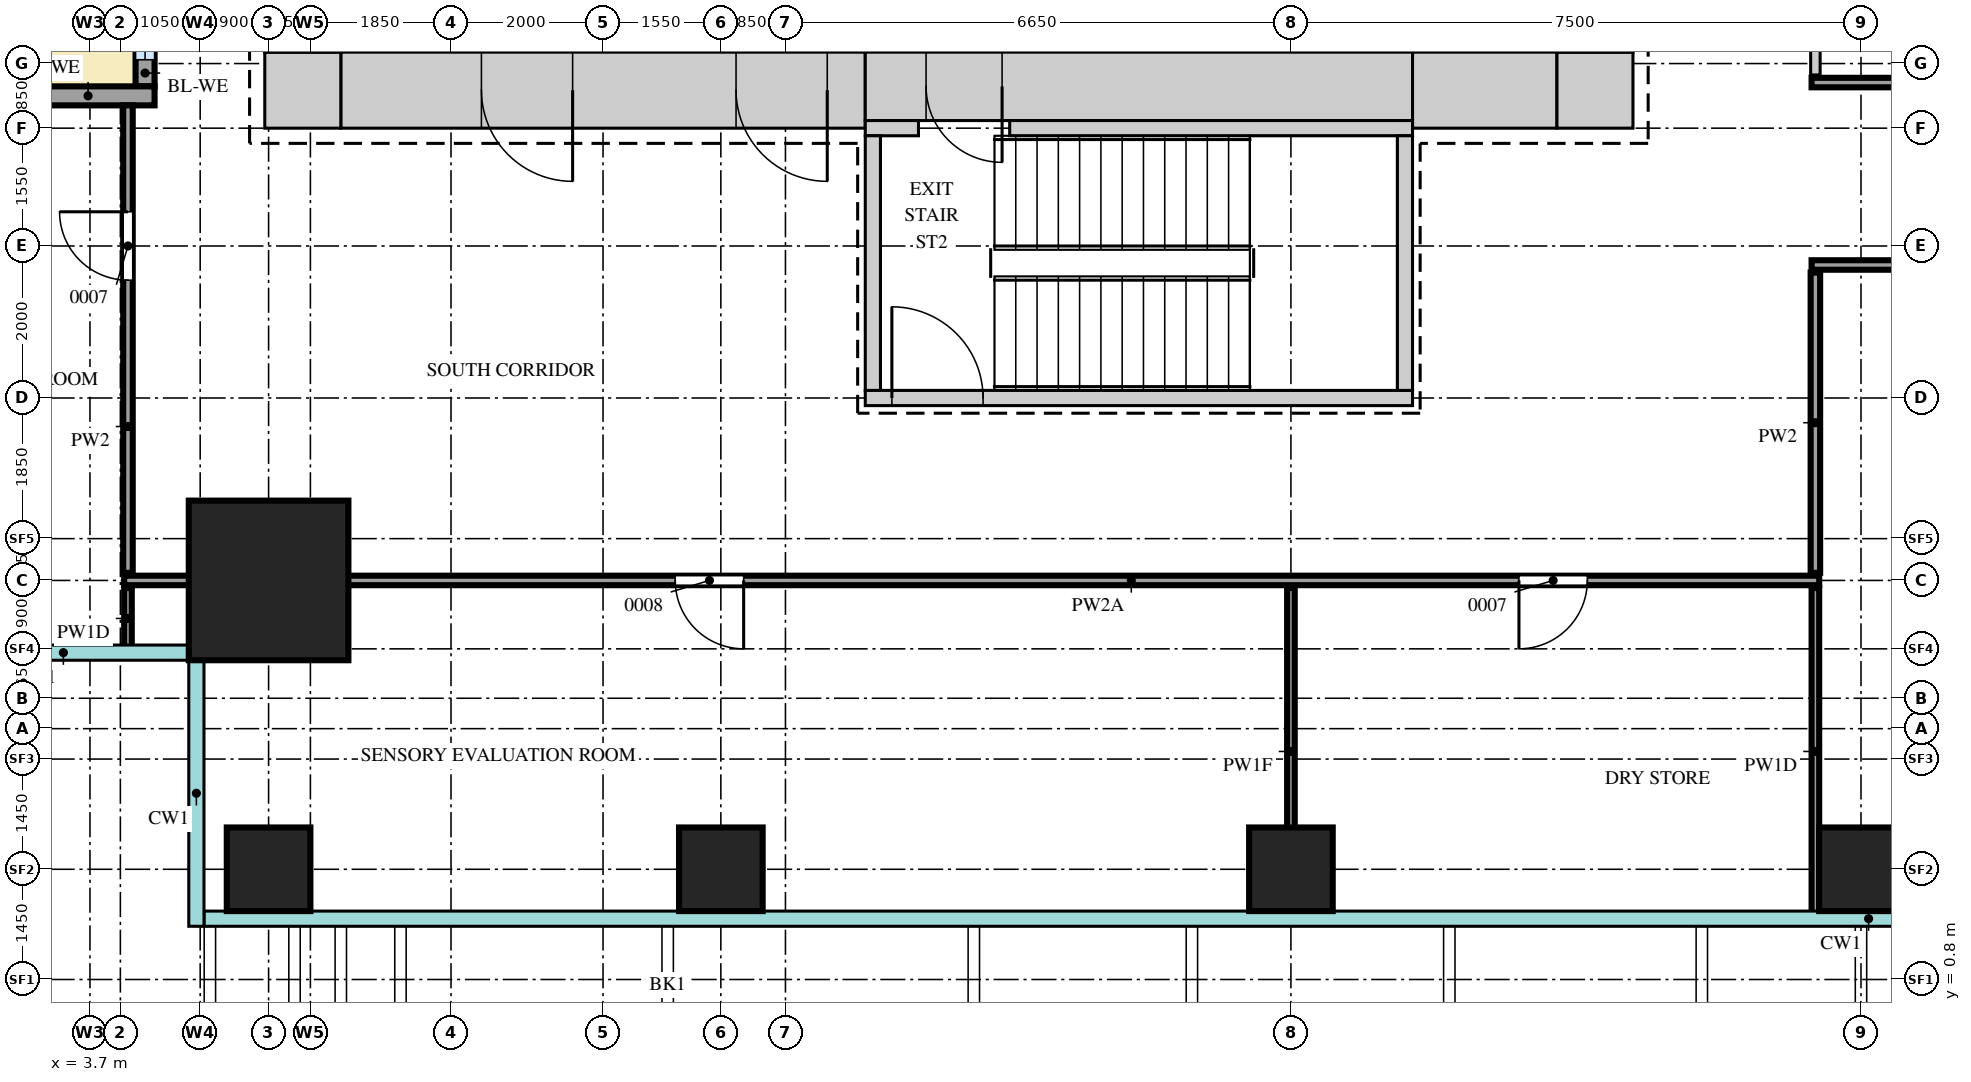
"""IFC4 building model, lengths in metres.
Left out: names, types, materials, properties, quantities, classifications, styles, units other than length and angle.
Written with IfcOpenShell. Run it as: python <this file> out.ifc"""

import sys

from ifc_helpers import new_model, si_unit, direction, frame, frame_2d, origin, origin_2d, place, context, subcontext, project, spatial, rectangle, extrude, source, transform, mapped, element, fill, save


model = new_model("IFC4")
c1 = context("Model", 3, precision=1e-05, world=origin(), true_north=direction((0.0, 1.0)))
c2 = subcontext(c1, "Body", "Model", "MODEL_VIEW")
j1 = project(units=[si_unit("LENGTHUNIT", "METRE"), si_unit("PLANEANGLEUNIT", "RADIAN")], contexts=[c1])
p1 = place(None, origin())
s1 = spatial("IfcSite", under=j1, at=p1, CompositionType="ELEMENT")
p2 = place(p1, origin())
s2 = spatial("IfcBuilding", under=s1, at=p2, CompositionType="ELEMENT")
p3 = place(p2, frame((0.0, 0.0, 114.7)))
s3 = spatial("IfcBuildingStorey", under=s2, at=p3, CompositionType="ELEMENT", Elevation=114.7)
m1 = source(origin(), c2, "Body", "SweptSolid", [
    extrude(rectangle(XDim=6.9, YDim=1.0, at=frame_2d((3.45, 0.0))), origin(), (0.0, 0.0, 1.0), 4.1),
])
p4 = place(p3, frame((7.0, 12.5, 0.0), z_axis=(0.0, 0.0, 1.0), x_axis=(1.0, 0.0, 0.0)))
e1 = element("IfcWall", 1, at=p4, inside=s3, PredefinedType="SHEAR", context=c2, shape_type="MappedRepresentation", body=[
    mapped(m1, transform((0.0, 0.0, 0.0))),
])
m2 = source(origin(), c2, "Body", "SweptSolid", [
    extrude(rectangle(XDim=1.2, YDim=2.1, at=frame_2d((0.6, 1.05))), frame((0.0, 0.51, 0.0), z_axis=(0.0, -1.0, 0.0), x_axis=(1.0, 0.0, 0.0)), (0.0, 0.0, 1.0), 1.02),
])
p5 = place(p4, frame((5.2, 0.0, 0.0)))
e2 = element("IfcOpeningElement", 2, at=p5, cuts=e1, PredefinedType="OPENING", context=c2, shape_type="MappedRepresentation", body=[
    mapped(m2, transform((0.0, 0.0, 0.0))),
])
p6 = place(p4, frame((1.85, 0.0, 0.0)))
e3 = element("IfcOpeningElement", 3, at=p6, cuts=e1, PredefinedType="OPENING", context=c2, shape_type="MappedRepresentation", body=[
    mapped(m2, transform((0.0, 0.0, 0.0))),
])
m3 = source(origin(), c2, "Body", "SweptSolid", [
    extrude(rectangle(XDim=7.2, YDim=0.9, at=frame_2d((3.6, 0.0))), origin(), (0.0, 0.0, 1.0), 4.1),
])
p7 = place(p3, frame((13.9, 12.55, 0.0), z_axis=(0.0, 0.0, 1.0), x_axis=(1.0, 0.0, 0.0)))
e4 = element("IfcWall", 4, at=p7, inside=s3, PredefinedType="SHEAR", context=c2, shape_type="MappedRepresentation", body=[
    mapped(m3, transform((0.0, 0.0, 0.0))),
])
m4 = source(origin(), c2, "Body", "SweptSolid", [
    extrude(rectangle(XDim=1.0, YDim=2.1, at=frame_2d((0.5, 1.05))), frame((0.0, 0.46, 0.0), z_axis=(0.0, -1.0, 0.0), x_axis=(1.0, 0.0, 0.0)), (0.0, 0.0, 1.0), 0.92),
])
p8 = place(p7, frame((0.8, 0.0, 0.0)))
e5 = element("IfcOpeningElement", 5, at=p8, cuts=e4, PredefinedType="OPENING", context=c2, shape_type="MappedRepresentation", body=[
    mapped(m4, transform((0.0, 0.0, 0.0))),
])
m5 = source(origin(), c2, "Body", "SweptSolid", [
    extrude(rectangle(XDim=1.9, YDim=1.0, at=frame_2d((0.95, 0.0))), origin(), (0.0, 0.0, 1.0), 4.1),
])
p9 = place(p3, frame((21.1, 12.5, 0.0), z_axis=(0.0, 0.0, 1.0), x_axis=(1.0, 0.0, 0.0)))
e6 = element("IfcWall", 6, at=p9, inside=s3, PredefinedType="SHEAR", context=c2, shape_type="MappedRepresentation", body=[
    mapped(m5, transform((0.0, 0.0, 0.0))),
])
m6 = source(origin(), c2, "Body", "SweptSolid", [
    extrude(rectangle(XDim=1.0, YDim=1.0, at=frame_2d((0.5, 0.0))), origin(), (0.0, 0.0, 1.0), 4.1),
])
for number, where, z_axis, x_axis in (
    (7, (23.0, 12.5, 0.0), (0.0, 0.0, 1.0), (1.0, 0.0, 0.0)),
    (8, (6.0, 12.5, 0.0), (0.0, 0.0, 1.0), (1.0, 0.0, 0.0)),
):
    element("IfcWall", number, at=place(p3, frame(where, z_axis=z_axis, x_axis=x_axis)), inside=s3, PredefinedType="SHEAR", context=c2, shape_type="MappedRepresentation", body=[
        mapped(m6, transform((0.0, 0.0, 0.0))),
    ])
m7 = source(origin(), c2, "Body", "SweptSolid", [
    extrude(rectangle(XDim=0.7, YDim=0.2, at=frame_2d((0.35, 0.0))), origin(), (0.0, 0.0, 1.0), 4.1),
])
p10 = place(p3, frame((13.9, 12.0, 0.0), z_axis=(0.0, 0.0, 1.0), x_axis=(1.0, 0.0, 0.0)))
e9 = element("IfcWall", 9, at=p10, inside=s3, PredefinedType="SHEAR", context=c2, shape_type="MappedRepresentation", body=[
    mapped(m7, transform((0.0, 0.0, 0.0))),
])
m8 = source(origin(), c2, "Body", "SweptSolid", [
    extrude(rectangle(XDim=5.3, YDim=0.2, at=frame_2d((2.65, 0.0))), origin(), (0.0, 0.0, 1.0), 4.1),
])
p11 = place(p3, frame((15.8, 12.0, 0.0), z_axis=(0.0, 0.0, 1.0), x_axis=(1.0, 0.0, 0.0)))
e10 = element("IfcWall", 10, at=p11, inside=s3, PredefinedType="SHEAR", context=c2, shape_type="MappedRepresentation", body=[
    mapped(m8, transform((0.0, 0.0, 0.0))),
])
m9 = source(origin(), c2, "Body", "SweptSolid", [
    extrude(rectangle(XDim=7.2, YDim=0.2, at=frame_2d((3.6, 0.0))), origin(), (0.0, 0.0, 1.0), 4.1),
])
p12 = place(p3, frame((13.9, 8.45, 0.0), z_axis=(0.0, 0.0, 1.0), x_axis=(1.0, 0.0, 0.0)))
e11 = element("IfcWall", 11, at=p12, inside=s3, PredefinedType="SHEAR", context=c2, shape_type="MappedRepresentation", body=[
    mapped(m9, transform((0.0, 0.0, 0.0))),
])
m10 = source(origin(), c2, "Body", "SweptSolid", [
    extrude(rectangle(XDim=1.2, YDim=2.1, at=frame_2d((0.6, 1.05))), frame((0.0, 0.11, 0.0), z_axis=(0.0, -1.0, 0.0), x_axis=(1.0, 0.0, 0.0)), (0.0, 0.0, 1.0), 0.22),
])
p13 = place(p12, frame((0.35, 0.0, 0.0)))
e12 = element("IfcOpeningElement", 12, at=p13, cuts=e11, PredefinedType="OPENING", context=c2, shape_type="MappedRepresentation", body=[
    mapped(m10, transform((0.0, 0.0, 0.0))),
])
m11 = source(origin(), c2, "Body", "SweptSolid", [
    extrude(rectangle(XDim=3.35, YDim=0.2, at=frame_2d((1.675, 0.0))), origin(), (0.0, 0.0, 1.0), 4.1),
])
for number, where, z_axis, x_axis in (
    (13, (21.0, 8.55, 0.0), (0.0, 0.0, 1.0), (0.0, 1.0, 0.0)),
    (14, (14.0, 8.55, 0.0), (0.0, 0.0, 1.0), (0.0, 1.0, 0.0)),
):
    element("IfcWall", number, at=place(p3, frame(where, z_axis=z_axis, x_axis=x_axis)), inside=s3, PredefinedType="SHEAR", context=c2, shape_type="MappedRepresentation", body=[
        mapped(m11, transform((0.0, 0.0, 0.0))),
    ])
m12 = source(origin(), c2, "Body", "SweptSolid", [
    extrude(rectangle(XDim=2.1, YDim=2.1, at=origin_2d()), origin(), (0.0, 0.0, 1.0), 4.4),
])
p14 = place(p3, frame((6.05, 6.05, 0.0), z_axis=(0.0, 0.0, 1.0), x_axis=(1.0, 0.0, 0.0)))
e15 = element("IfcColumn", 15, at=p14, inside=s3, PredefinedType="COLUMN", context=c2, shape_type="MappedRepresentation", body=[
    mapped(m12, transform((0.0, 0.0, 0.0))),
])
m13 = source(origin(), c2, "Body", "SweptSolid", [
    extrude(rectangle(XDim=1.1, YDim=1.1, at=origin_2d()), origin(), (0.0, 0.0, 1.0), 4.1),
])
for number, where, z_axis, x_axis in (
    (16, (6.05, 2.25, 0.0), (0.0, 0.0, 1.0), (1.0, 0.0, 0.0)),
    (17, (12.0, 2.25, 0.0), (0.0, 0.0, 1.0), (1.0, 0.0, 0.0)),
    (18, (19.5, 2.25, 0.0), (0.0, 0.0, 1.0), (1.0, 0.0, 0.0)),
    (19, (27.0, 2.25, 0.0), (0.0, 0.0, 1.0), (1.0, 0.0, 0.0)),
):
    element("IfcColumn", number, at=place(p3, frame(where, z_axis=z_axis, x_axis=x_axis)), inside=s3, PredefinedType="COLUMN", context=c2, shape_type="MappedRepresentation", body=[
        mapped(m13, transform((0.0, 0.0, 0.0))),
    ])
m14 = source(origin(), c2, "Body", "SweptSolid", [
    extrude(rectangle(XDim=6.4, YDim=0.25, at=frame_2d((3.2, 0.0))), origin(), (0.0, 0.0, 1.0), 3.5),
])
p15 = place(p3, frame((4.425, 12.55, 0.0), z_axis=(0.0, 0.0, 1.0), x_axis=(0.0, 1.0, 0.0)))
e20 = element("IfcWall", 20, at=p15, inside=s3, PredefinedType="SOLIDWALL", context=c2, shape_type="MappedRepresentation", body=[
    mapped(m14, transform((0.0, 0.0, 0.0))),
])
m15 = source(origin(), c2, "Body", "SweptSolid", [
    extrude(rectangle(XDim=1.65, YDim=2.4, at=frame_2d((0.825, 1.2))), frame((0.0, 0.135, 0.0), z_axis=(0.0, -1.0, 0.0), x_axis=(1.0, 0.0, 0.0)), (0.0, 0.0, 1.0), 0.27),
])
p16 = place(p15, frame((0.35, 0.0, 0.0)))
e21 = element("IfcOpeningElement", 21, at=p16, cuts=e20, PredefinedType="OPENING", context=c2, shape_type="MappedRepresentation", body=[
    mapped(m15, transform((0.0, 0.0, 0.0))),
])
p17 = place(p15, frame((4.4, 0.0, 0.0)))
e22 = element("IfcOpeningElement", 22, at=p17, cuts=e20, PredefinedType="OPENING", context=c2, shape_type="MappedRepresentation", body=[
    mapped(m15, transform((0.0, 0.0, 0.0))),
])
m16 = source(origin(), c2, "Body", "SweptSolid", [
    extrude(rectangle(XDim=1.8, YDim=2.4, at=frame_2d((0.9, 1.2))), frame((0.0, 0.135, 0.0), z_axis=(0.0, -1.0, 0.0), x_axis=(1.0, 0.0, 0.0)), (0.0, 0.0, 1.0), 0.27),
])
p18 = place(p15, frame((2.3, 0.0, 0.0)))
e23 = element("IfcOpeningElement", 23, at=p18, cuts=e20, PredefinedType="OPENING", context=c2, shape_type="MappedRepresentation", body=[
    mapped(m16, transform((0.0, 0.0, 0.0))),
])
m17 = source(origin(), c2, "Body", "SweptSolid", [
    extrude(rectangle(XDim=1.75, YDim=0.25, at=frame_2d((0.875, 0.0))), origin(), (0.0, 0.0, 1.0), 3.5),
])
p19 = place(p3, frame((2.8, 12.425, 0.0), z_axis=(0.0, 0.0, 1.0), x_axis=(1.0, 0.0, 0.0)))
e24 = element("IfcWall", 24, at=p19, inside=s3, PredefinedType="SOLIDWALL", context=c2, shape_type="MappedRepresentation", body=[
    mapped(m17, transform((0.0, 0.0, 0.0))),
])
m18 = source(origin(), c2, "Body", "SweptSolid", [
    extrude(rectangle(XDim=4.3, YDim=0.1, at=frame_2d((2.15, 0.0))), origin(), (0.0, 0.0, 1.0), 3.77),
])
p20 = place(p3, frame((19.5, 1.65, 0.0), z_axis=(0.0, 0.0, 1.0), x_axis=(0.0, 1.0, 0.0)))
e25 = element("IfcWall", 25, at=p20, inside=s3, PredefinedType="PARTITIONING", context=c2, shape_type="MappedRepresentation", body=[
    mapped(m18, transform((0.0, 0.0, 0.0))),
])
m19 = source(origin(), c2, "Body", "SweptSolid", [
    extrude(rectangle(XDim=4.3, YDim=0.1, at=frame_2d((2.15, 0.0))), origin(), (0.0, 0.0, 1.0), 4.2),
])
p21 = place(p3, frame((26.4, 1.65, 0.0), z_axis=(0.0, 0.0, 1.0), x_axis=(0.0, 1.0, 0.0)))
e26 = element("IfcWall", 26, at=p21, inside=s3, PredefinedType="PARTITIONING", context=c2, shape_type="MappedRepresentation", body=[
    mapped(m19, transform((0.0, 0.0, 0.0))),
])
m20 = source(origin(), c2, "Body", "SweptSolid", [
    extrude(rectangle(XDim=0.8, YDim=0.1, at=frame_2d((0.4, 0.0))), origin(), (0.0, 0.0, 1.0), 4.2),
])
p22 = place(p3, frame((4.2, 5.15, 0.0), z_axis=(0.0, 0.0, 1.0), x_axis=(0.0, 1.0, 0.0)))
e27 = element("IfcWall", 27, at=p22, inside=s3, PredefinedType="PARTITIONING", context=c2, shape_type="MappedRepresentation", body=[
    mapped(m20, transform((0.0, 0.0, 0.0))),
])
m21 = source(origin(), c2, "Body", "SweptSolid", [
    extrude(rectangle(XDim=22.3, YDim=0.125, at=frame_2d((11.15, 0.0))), origin(), (0.0, 0.0, 1.0), 3.55),
])
p23 = place(p3, frame((4.15, 6.05, 0.0), z_axis=(0.0, 0.0, 1.0), x_axis=(1.0, 0.0, 0.0)))
e28 = element("IfcWall", 28, at=p23, inside=s3, PredefinedType="PARTITIONING", context=c2, shape_type="MappedRepresentation", body=[
    mapped(m21, transform((0.0, 0.0, 0.0))),
])
m22 = source(origin(), c2, "Body", "SweptSolid", [
    extrude(rectangle(XDim=0.9, YDim=2.1, at=frame_2d((0.45, 1.05))), frame((0.0, 0.073, 0.0), z_axis=(0.0, -1.0, 0.0), x_axis=(1.0, 0.0, 0.0)), (0.0, 0.0, 1.0), 0.145),
])
p24 = place(p23, frame((7.25, 0.0, 0.0)))
e29 = element("IfcOpeningElement", 29, at=p24, cuts=e28, PredefinedType="OPENING", context=c2, shape_type="MappedRepresentation", body=[
    mapped(m22, transform((0.0, 0.0, 0.0))),
])
p25 = place(p23, frame((18.35, 0.0, 0.0)))
e30 = element("IfcOpeningElement", 30, at=p25, cuts=e28, PredefinedType="OPENING", context=c2, shape_type="MappedRepresentation", body=[
    mapped(m22, transform((0.0, 0.0, 0.0))),
])
m23 = source(origin(), c2, "Body", "SweptSolid", [
    extrude(rectangle(XDim=6.15, YDim=0.125, at=frame_2d((3.075, 0.0))), origin(), (0.0, 0.0, 1.0), 4.2),
])
p26 = place(p3, frame((4.2, 6.15, 0.0), z_axis=(0.0, 0.0, 1.0), x_axis=(0.0, 1.0, 0.0)))
e31 = element("IfcWall", 31, at=p26, inside=s3, PredefinedType="PARTITIONING", context=c2, shape_type="MappedRepresentation", body=[
    mapped(m23, transform((0.0, 0.0, 0.0))),
])
p27 = place(p26, frame((3.85, 0.0, 0.0)))
e32 = element("IfcOpeningElement", 32, at=p27, cuts=e31, PredefinedType="OPENING", context=c2, shape_type="MappedRepresentation", body=[
    mapped(m22, transform((0.0, 0.0, 0.0))),
])
m24 = source(origin(), c2, "Body", "SweptSolid", [
    extrude(rectangle(XDim=3.95, YDim=0.125, at=frame_2d((1.975, 0.0))), origin(), (0.0, 0.0, 1.0), 4.2),
])
p28 = place(p3, frame((26.4, 6.15, 0.0), z_axis=(0.0, 0.0, 1.0), x_axis=(0.0, 1.0, 0.0)))
e33 = element("IfcWall", 33, at=p28, inside=s3, PredefinedType="PARTITIONING", context=c2, shape_type="MappedRepresentation", body=[
    mapped(m24, transform((0.0, 0.0, 0.0))),
])
m25 = source(origin(), c2, "Body", "SweptSolid", [
    extrude(rectangle(XDim=20.0, YDim=0.125, at=frame_2d((10.0, 0.0))), origin(), (0.0, 0.0, 1.0), 4.2),
])
p29 = place(p3, frame((26.35, 10.2, 0.0), z_axis=(0.0, 0.0, 1.0), x_axis=(1.0, 0.0, 0.0)))
e34 = element("IfcWall", 34, at=p29, inside=s3, PredefinedType="PARTITIONING", context=c2, shape_type="MappedRepresentation", body=[
    mapped(m25, transform((0.0, 0.0, 0.0))),
])
m26 = source(origin(), c2, "Body", "SweptSolid", [
    extrude(rectangle(XDim=1.2, YDim=2.1, at=frame_2d((0.6, 1.05))), frame((0.0, 0.073, 0.0), z_axis=(0.0, -1.0, 0.0), x_axis=(1.0, 0.0, 0.0)), (0.0, 0.0, 1.0), 0.145),
])
p30 = place(p29, frame((7.25, 0.0, 0.0)))
e35 = element("IfcOpeningElement", 35, at=p30, cuts=e34, PredefinedType="OPENING", context=c2, shape_type="MappedRepresentation", body=[
    mapped(m26, transform((0.0, 0.0, 0.0))),
])
p31 = place(p29, frame((18.4, 0.0, 0.0)))
e36 = element("IfcOpeningElement", 36, at=p31, cuts=e34, PredefinedType="OPENING", context=c2, shape_type="MappedRepresentation", body=[
    mapped(m26, transform((0.0, 0.0, 0.0))),
])
m27 = source(origin(), c2, "Body", "SweptSolid", [
    extrude(rectangle(XDim=17.7, YDim=0.125, at=frame_2d((8.85, 0.0))), origin(), (0.0, 0.0, 1.0), 4.2),
])
p32 = place(p3, frame((26.35, 12.6, 0.0), z_axis=(0.0, 0.0, 1.0), x_axis=(1.0, 0.0, 0.0)))
e37 = element("IfcWall", 37, at=p32, inside=s3, PredefinedType="PARTITIONING", context=c2, shape_type="MappedRepresentation", body=[
    mapped(m27, transform((0.0, 0.0, 0.0))),
])
m28 = source(origin(), c2, "Body", "SweptSolid", [
    extrude(rectangle(XDim=23.2, YDim=0.125, at=frame_2d((11.6, 0.0))), origin(), (0.0, 0.0, 1.0), 4.2),
])
p33 = place(p3, frame((26.4, 12.7, 0.0), z_axis=(0.0, 0.0, 1.0), x_axis=(0.0, 1.0, 0.0)))
e38 = element("IfcWall", 38, at=p33, inside=s3, PredefinedType="PARTITIONING", context=c2, shape_type="MappedRepresentation", body=[
    mapped(m28, transform((0.0, 0.0, 0.0))),
])
p34 = place(p33, frame((6.65, 0.0, 0.0)))
e39 = element("IfcOpeningElement", 39, at=p34, cuts=e38, PredefinedType="OPENING", context=c2, shape_type="MappedRepresentation", body=[
    mapped(m26, transform((0.0, 0.0, 0.0))),
])
m29 = source(origin(), c2, "Body", "SweptSolid", [
    extrude(rectangle(XDim=1.65, YDim=2.4, at=frame_2d((0.825, 1.2))), frame((0.0, 0.03, 0.0), z_axis=(0.0, -1.0, 0.0), x_axis=(1.0, 0.0, 0.0)), (0.0, 0.0, 1.0), 0.06),
])
p35 = place(p16, origin())
e40 = element("IfcWindow", 40, at=p35, inside=s3, PartitioningType="SINGLE_PANEL", PredefinedType="WINDOW", context=c2, shape_type="MappedRepresentation", body=[
    mapped(m29, transform((0.0, 0.0, 0.0))),
])
fill(e21, e40)
m30 = source(origin(), c2, "Body", "SweptSolid", [
    extrude(rectangle(XDim=1.2, YDim=2.1, at=frame_2d((0.6, 1.05))), frame((0.0, 0.45, 0.0), z_axis=(0.0, -1.0, 0.0), x_axis=(1.0, 0.0, 0.0)), (0.0, 0.0, 1.0), 0.9),
])
p36 = place(p5, origin())
e41 = element("IfcDoor", 41, at=p36, inside=s3, OperationType="SINGLE_SWING_RIGHT", PredefinedType="DOOR", context=c2, shape_type="MappedRepresentation", body=[
    mapped(m30, transform((0.0, 0.0, 0.0))),
])
fill(e2, e41)
p37 = place(p6, origin())
e42 = element("IfcDoor", 42, at=p37, inside=s3, OperationType="SINGLE_SWING_RIGHT", PredefinedType="DOOR", context=c2, shape_type="MappedRepresentation", body=[
    mapped(m30, transform((0.0, 0.0, 0.0))),
])
fill(e3, e42)
m31 = source(origin(), c2, "Body", "SweptSolid", [
    extrude(rectangle(XDim=1.0, YDim=2.1, at=frame_2d((0.5, 1.05))), frame((0.0, 0.4, 0.0), z_axis=(0.0, -1.0, 0.0), x_axis=(1.0, 0.0, 0.0)), (0.0, 0.0, 1.0), 0.8),
])
p38 = place(p8, origin())
e43 = element("IfcDoor", 43, at=p38, inside=s3, OperationType="SINGLE_SWING_RIGHT", PredefinedType="DOOR", context=c2, shape_type="MappedRepresentation", body=[
    mapped(m31, transform((0.0, 0.0, 0.0))),
])
fill(e5, e43)
m32 = source(origin(), c2, "Body", "SweptSolid", [
    extrude(rectangle(XDim=0.9, YDim=2.1, at=frame_2d((0.45, 1.05))), frame((0.0, 0.025, 0.0), z_axis=(0.0, -1.0, 0.0), x_axis=(1.0, 0.0, 0.0)), (0.0, 0.0, 1.0), 0.05),
])
p39 = place(p24, origin())
e44 = element("IfcDoor", 44, at=p39, inside=s3, OperationType="SINGLE_SWING_RIGHT", PredefinedType="DOOR", context=c2, shape_type="MappedRepresentation", body=[
    mapped(m32, transform((0.0, 0.0, 0.0))),
])
fill(e29, e44)
p40 = place(p25, origin())
e45 = element("IfcDoor", 45, at=p40, inside=s3, OperationType="SINGLE_SWING_LEFT", PredefinedType="DOOR", context=c2, shape_type="MappedRepresentation", body=[
    mapped(m32, transform((0.0, 0.0, 0.0))),
])
fill(e30, e45)
p41 = place(p27, origin())
e46 = element("IfcDoor", 46, at=p41, inside=s3, OperationType="SINGLE_SWING_LEFT", PredefinedType="DOOR", context=c2, shape_type="MappedRepresentation", body=[
    mapped(m32, transform((0.0, 0.0, 0.0))),
])
fill(e32, e46)
m33 = source(origin(), c2, "Body", "SweptSolid", [
    extrude(rectangle(XDim=1.2, YDim=2.1, at=frame_2d((0.6, 1.05))), frame((0.0, 0.025, 0.0), z_axis=(0.0, -1.0, 0.0), x_axis=(1.0, 0.0, 0.0)), (0.0, 0.0, 1.0), 0.05),
])
p42 = place(p13, origin())
e47 = element("IfcDoor", 47, at=p42, inside=s3, OperationType="SINGLE_SWING_RIGHT", PredefinedType="DOOR", context=c2, shape_type="MappedRepresentation", body=[
    mapped(m33, transform((0.0, 0.0, 0.0))),
])
fill(e12, e47)
save(model, sys.argv[1])
